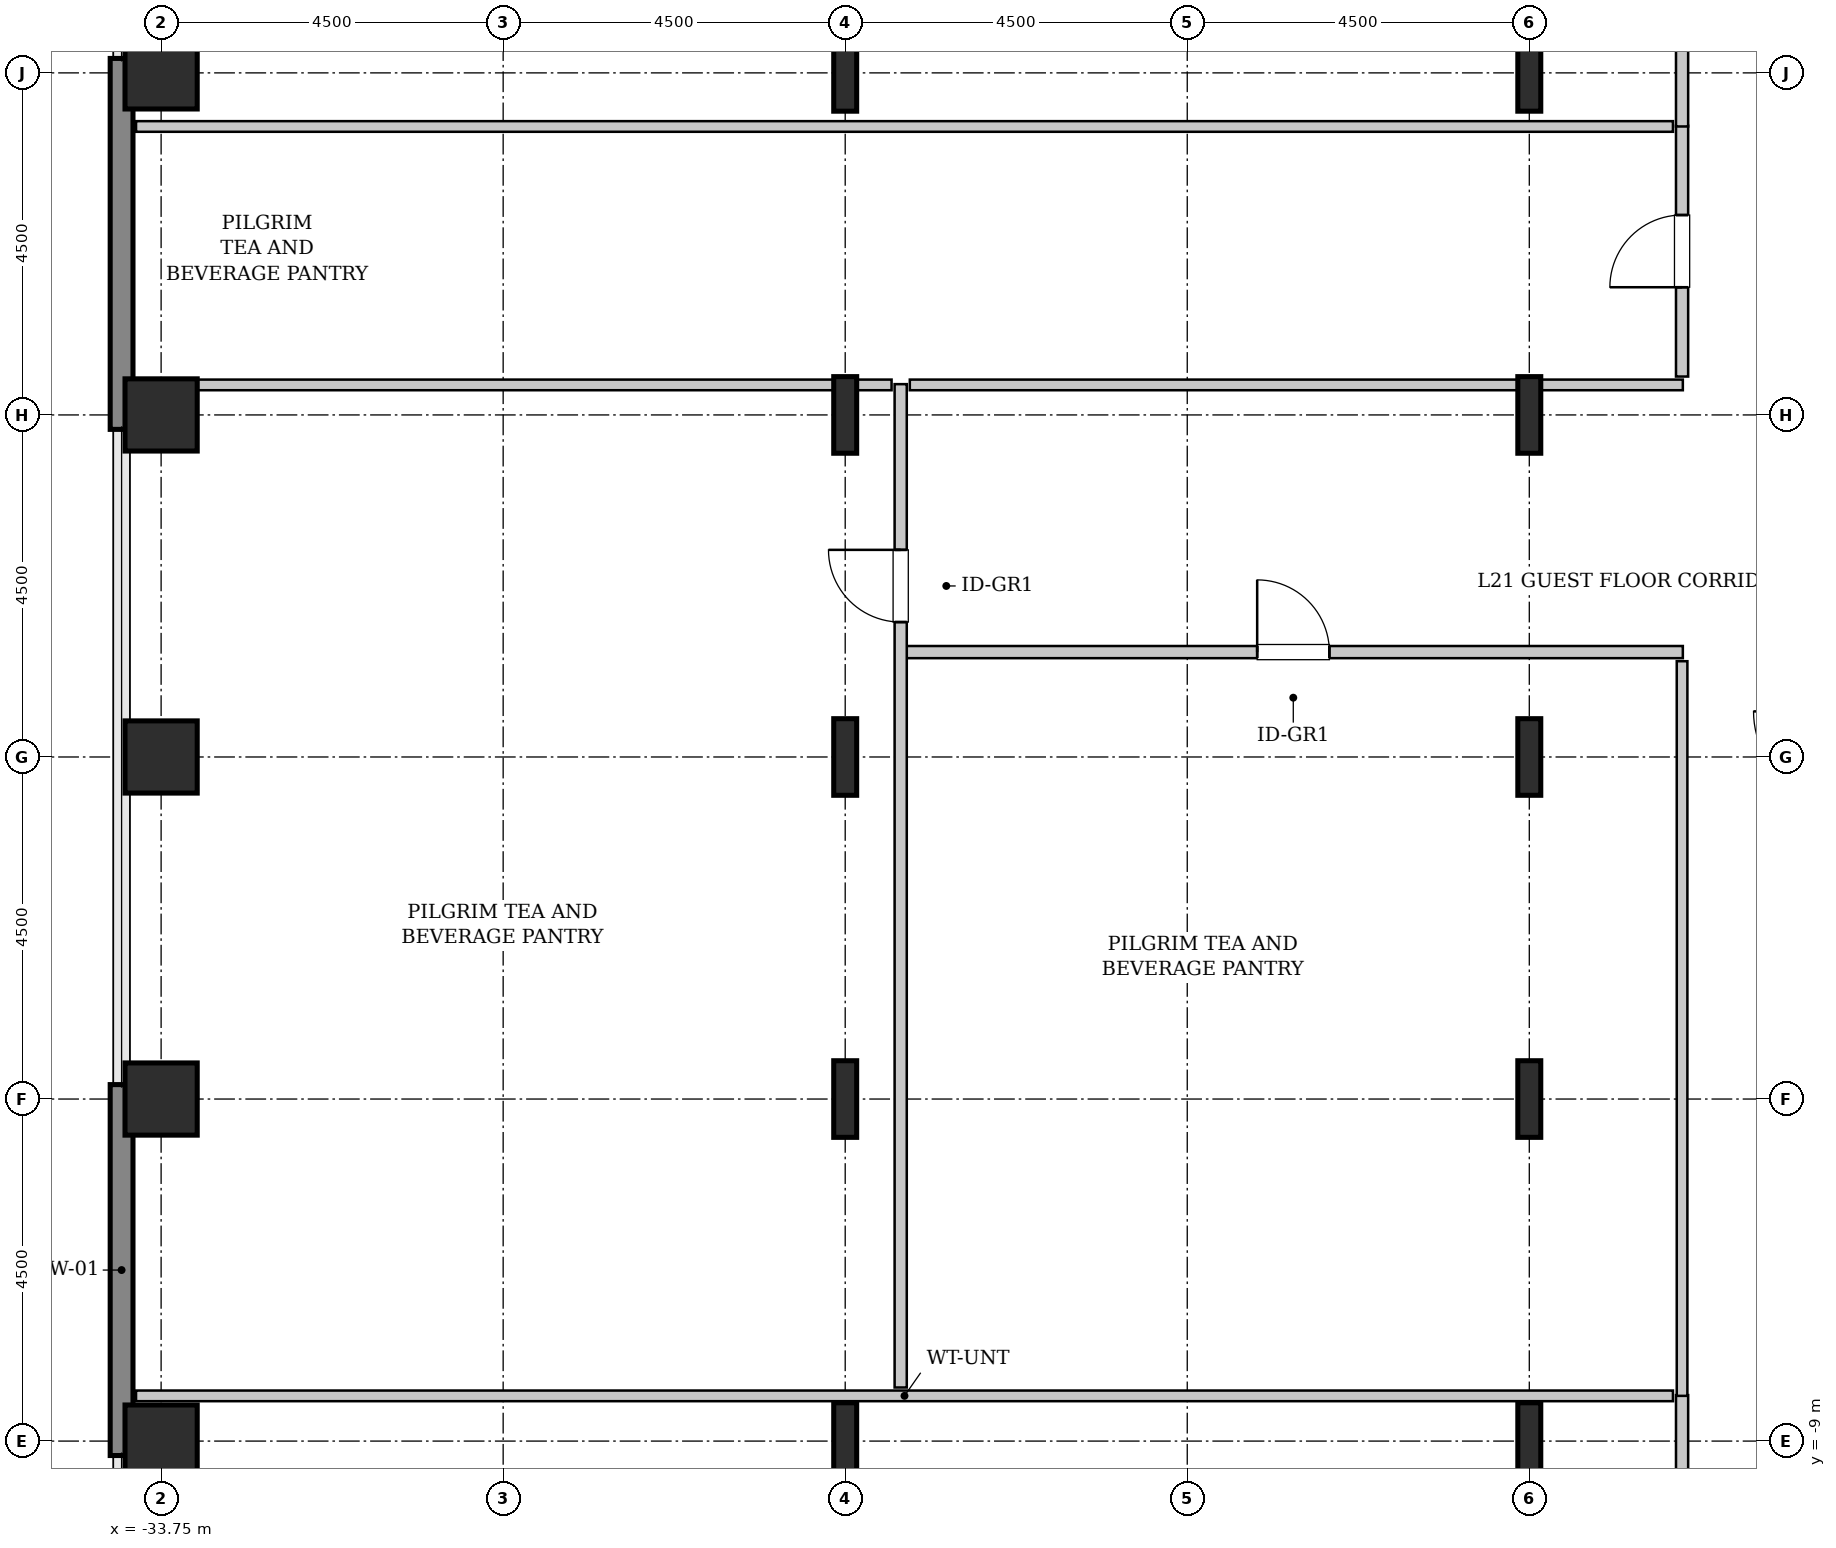
"""IFC4 building model, lengths in metres.
Left out: names, types, materials, properties, quantities, classifications, styles, units other than length and angle.
Written with IfcOpenShell. Run it as: python <this file> out.ifc"""

import sys

from ifc_helpers import new_model, si_unit, direction, frame, frame_2d, origin, origin_2d, place, context, subcontext, project, spatial, rectangle, hollow_rectangle, i_section, extrude, source, transform, mapped, element, fill, save


model = new_model("IFC4")
c1 = context("Model", 3, precision=1e-05, world=origin(), true_north=direction((0.0, 1.0)))
c2 = subcontext(c1, "Body", "Model", "MODEL_VIEW")
j1 = project(units=[si_unit("LENGTHUNIT", "METRE"), si_unit("PLANEANGLEUNIT", "RADIAN")], contexts=[c1])
p1 = place(None, origin())
s1 = spatial("IfcSite", under=j1, at=p1, CompositionType="ELEMENT")
p2 = place(p1, origin())
s2 = spatial("IfcBuilding", under=s1, at=p2, CompositionType="ELEMENT")
p3 = place(p2, frame((0.0, 0.0, 90.8)))
s3 = spatial("IfcBuildingStorey", under=s2, at=p3, CompositionType="ELEMENT", Elevation=90.8)
m1 = source(origin(), c2, "Body", "SweptSolid", [
    extrude(hollow_rectangle(XDim=0.95, YDim=0.95, WallThickness=0.045, InnerFilletRadius=0.045, OuterFilletRadius=0.09, at=origin_2d()), origin(), (0.0, 0.0, 1.0), 3.8),
])
for number, where, z_axis, x_axis in (
    (1, (-33.75, -9.0, 0.0), (0.0, 0.0, 1.0), (1.0, 0.0, 0.0)),
    (2, (-33.75, -4.5, 0.0), (0.0, 0.0, 1.0), (1.0, 0.0, 0.0)),
    (3, (-33.75, 0.0, 0.0), (0.0, 0.0, 1.0), (1.0, 0.0, 0.0)),
    (4, (-33.75, 4.5, 0.0), (0.0, 0.0, 1.0), (1.0, 0.0, 0.0)),
    (5, (-33.75, 9.0, 0.0), (0.0, 0.0, 1.0), (1.0, 0.0, 0.0)),
):
    element("IfcColumn", number, at=place(p3, frame(where, z_axis=z_axis, x_axis=x_axis)), inside=s3, PredefinedType="COLUMN", context=c2, shape_type="MappedRepresentation", body=[
        mapped(m1, transform((0.0, 0.0, 0.0), x_axis=(1.0, 0.0, 0.0), y_axis=(0.0, 1.0, 0.0), z_axis=(0.0, 0.0, 1.0), scale=1.0)),
    ])
m2 = source(origin(), c2, "Body", "SweptSolid", [
    extrude(i_section(OverallWidth=0.302, OverallDepth=1.008, WebThickness=0.021, FlangeThickness=0.04, FilletRadius=0.03, at=origin_2d()), origin(), (0.0, 0.0, 1.0), 3.8),
])
for number, where, z_axis, x_axis in (
    (6, (-24.75, -9.0, 0.0), (0.0, 0.0, 1.0), (1.0, 0.0, 0.0)),
    (7, (-24.75, -4.5, 0.0), (0.0, 0.0, 1.0), (1.0, 0.0, 0.0)),
    (8, (-24.75, 0.0, 0.0), (0.0, 0.0, 1.0), (1.0, 0.0, 0.0)),
    (9, (-24.75, 4.5, 0.0), (0.0, 0.0, 1.0), (1.0, 0.0, 0.0)),
    (10, (-24.75, 9.0, 0.0), (0.0, 0.0, 1.0), (1.0, 0.0, 0.0)),
    (11, (-15.75, -9.0, 0.0), (0.0, 0.0, 1.0), (1.0, 0.0, 0.0)),
    (12, (-15.75, -4.5, 0.0), (0.0, 0.0, 1.0), (1.0, 0.0, 0.0)),
    (13, (-15.75, 0.0, 0.0), (0.0, 0.0, 1.0), (1.0, 0.0, 0.0)),
    (14, (-15.75, 4.5, 0.0), (0.0, 0.0, 1.0), (1.0, 0.0, 0.0)),
    (15, (-15.75, 9.0, 0.0), (0.0, 0.0, 1.0), (1.0, 0.0, 0.0)),
):
    element("IfcColumn", number, at=place(p3, frame(where, z_axis=z_axis, x_axis=x_axis)), inside=s3, PredefinedType="COLUMN", context=c2, shape_type="MappedRepresentation", body=[
        mapped(m2, transform((0.0, 0.0, 0.0), x_axis=(1.0, 0.0, 0.0), y_axis=(0.0, 1.0, 0.0), z_axis=(0.0, 0.0, 1.0), scale=1.0)),
    ])
m3 = source(origin(), c2, "Body", "SweptSolid", [
    extrude(rectangle(XDim=4.88, YDim=0.3, at=frame_2d((2.44, 0.0))), origin(), (0.0, 0.0, 1.0), 3.55),
])
for number, where, z_axis, x_axis in (
    (16, (-34.27, -9.19, 0.0), (0.0, 0.0, 1.0), (0.0, 1.0, 0.0)),
    (17, (-34.27, 4.31, 0.0), (0.0, 0.0, 1.0), (0.0, 1.0, 0.0)),
):
    element("IfcWall", number, at=place(p3, frame(where, z_axis=z_axis, x_axis=x_axis)), inside=s3, PredefinedType="SHEAR", context=c2, shape_type="MappedRepresentation", body=[
        mapped(m3, transform((0.0, 0.0, 0.0), x_axis=(1.0, 0.0, 0.0), y_axis=(0.0, 1.0, 0.0), z_axis=(0.0, 0.0, 1.0), scale=1.0)),
    ])
m4 = source(origin(), c2, "Body", "SweptSolid", [
    extrude(rectangle(XDim=12.845, YDim=0.16, at=frame_2d((6.422, 0.0))), origin(), (0.0, 0.0, 1.0), 3.535),
])
p4 = place(p3, frame((-13.74, -21.24, 0.0), z_axis=(0.0, 0.0, 1.0), x_axis=(0.0, 1.0, 0.0)))
e18 = element("IfcWall", 18, at=p4, inside=s3, PredefinedType="PARTITIONING", context=c2, shape_type="MappedRepresentation", body=[
    mapped(m4, transform((0.0, 0.0, 0.0), x_axis=(1.0, 0.0, 0.0), y_axis=(0.0, 1.0, 0.0), z_axis=(0.0, 0.0, 1.0), scale=1.0)),
])
p5 = place(p4, frame((10.812, 0.0, 0.0)))
e19 = element("IfcOpeningElement", 19, at=p5, cuts=e18, PredefinedType="OPENING", context=c2, shape_type="SweptSolid", body=[
    extrude(rectangle(XDim=0.95, YDim=2.1, at=frame_2d((0.475, 1.05))), frame((0.0, 0.09, 0.0), z_axis=(0.0, -1.0, 0.0), x_axis=(1.0, 0.0, 0.0)), (0.0, 0.0, 1.0), 0.18),
])
m5 = source(origin(), c2, "Body", "SweptSolid", [
    extrude(rectangle(XDim=20.22, YDim=0.14, at=frame_2d((10.11, 0.0))), origin(), (0.0, 0.0, 1.0), 3.535),
])
p6 = place(p3, frame((-34.08, -8.405, 0.0), z_axis=(0.0, 0.0, 1.0), x_axis=(1.0, 0.0, 0.0)))
e20 = element("IfcWall", 20, at=p6, inside=s3, PredefinedType="PARTITIONING", context=c2, shape_type="MappedRepresentation", body=[
    mapped(m5, transform((0.0, 0.0, 0.0), x_axis=(1.0, 0.0, 0.0), y_axis=(0.0, 1.0, 0.0), z_axis=(0.0, 0.0, 1.0), scale=1.0)),
])
m6 = source(origin(), c2, "Body", "SweptSolid", [
    extrude(rectangle(XDim=10.25, YDim=0.16, at=frame_2d((5.125, 0.0))), origin(), (0.0, 0.0, 1.0), 3.535),
])
p7 = place(p3, frame((-23.98, 1.38, 0.0), z_axis=(0.0, 0.0, 1.0), x_axis=(1.0, 0.0, 0.0)))
e21 = element("IfcWall", 21, at=p7, inside=s3, PredefinedType="PARTITIONING", context=c2, shape_type="MappedRepresentation", body=[
    mapped(m6, transform((0.0, 0.0, 0.0), x_axis=(1.0, 0.0, 0.0), y_axis=(0.0, 1.0, 0.0), z_axis=(0.0, 0.0, 1.0), scale=1.0)),
])
p8 = place(p7, frame((4.65, 0.0, 0.0)))
e22 = element("IfcOpeningElement", 22, at=p8, cuts=e21, PredefinedType="OPENING", context=c2, shape_type="SweptSolid", body=[
    extrude(rectangle(XDim=0.95, YDim=2.1, at=frame_2d((0.475, 1.05))), frame((0.0, 0.09, 0.0), z_axis=(0.0, -1.0, 0.0), x_axis=(1.0, 0.0, 0.0)), (0.0, 0.0, 1.0), 0.18),
])
m7 = source(origin(), c2, "Body", "SweptSolid", [
    extrude(rectangle(XDim=9.665, YDim=0.14, at=frame_2d((4.833, 0.0))), origin(), (0.0, 0.0, 1.0), 3.535),
])
p9 = place(p3, frame((-13.74, -8.405, 0.0), z_axis=(0.0, 0.0, 1.0), x_axis=(0.0, 1.0, 0.0)))
e23 = element("IfcWall", 23, at=p9, inside=s3, PredefinedType="PARTITIONING", context=c2, shape_type="MappedRepresentation", body=[
    mapped(m7, transform((0.0, 0.0, 0.0), x_axis=(1.0, 0.0, 0.0), y_axis=(0.0, 1.0, 0.0), z_axis=(0.0, 0.0, 1.0), scale=1.0)),
])
m8 = source(origin(), c2, "Body", "SweptSolid", [
    extrude(rectangle(XDim=13.2, YDim=0.16, at=frame_2d((6.6, 0.0))), origin(), (0.0, 0.0, 1.0), 3.535),
])
p10 = place(p3, frame((-24.02, -8.295, 0.0), z_axis=(0.0, 0.0, 1.0), x_axis=(0.0, 1.0, 0.0)))
e24 = element("IfcWall", 24, at=p10, inside=s3, PredefinedType="PARTITIONING", context=c2, shape_type="MappedRepresentation", body=[
    mapped(m8, transform((0.0, 0.0, 0.0), x_axis=(1.0, 0.0, 0.0), y_axis=(0.0, 1.0, 0.0), z_axis=(0.0, 0.0, 1.0), scale=1.0)),
])
p11 = place(p10, frame((10.07, 0.0, 0.0)))
e25 = element("IfcOpeningElement", 25, at=p11, cuts=e24, PredefinedType="OPENING", context=c2, shape_type="SweptSolid", body=[
    extrude(rectangle(XDim=0.95, YDim=2.1, at=frame_2d((0.475, 1.05))), frame((0.0, 0.09, 0.0), z_axis=(0.0, -1.0, 0.0), x_axis=(1.0, 0.0, 0.0)), (0.0, 0.0, 1.0), 0.18),
])
m9 = source(origin(), c2, "Body", "SweptSolid", [
    extrude(rectangle(XDim=9.94, YDim=0.14, at=frame_2d((4.97, 0.0))), origin(), (0.0, 0.0, 1.0), 2.825),
])
p12 = place(p3, frame((-34.08, 4.895, 0.0), z_axis=(0.0, 0.0, 1.0), x_axis=(1.0, 0.0, 0.0)))
e26 = element("IfcWall", 26, at=p12, inside=s3, PredefinedType="PARTITIONING", context=c2, shape_type="MappedRepresentation", body=[
    mapped(m9, transform((0.0, 0.0, 0.0), x_axis=(1.0, 0.0, 0.0), y_axis=(0.0, 1.0, 0.0), z_axis=(0.0, 0.0, 1.0), scale=1.0)),
])
m10 = source(origin(), c2, "Body", "SweptSolid", [
    extrude(rectangle(XDim=10.17, YDim=0.14, at=frame_2d((5.085, 0.0))), origin(), (0.0, 0.0, 1.0), 2.825),
])
p13 = place(p3, frame((-23.9, 4.895, 0.0), z_axis=(0.0, 0.0, 1.0), x_axis=(1.0, 0.0, 0.0)))
e27 = element("IfcWall", 27, at=p13, inside=s3, PredefinedType="PARTITIONING", context=c2, shape_type="MappedRepresentation", body=[
    mapped(m10, transform((0.0, 0.0, 0.0), x_axis=(1.0, 0.0, 0.0), y_axis=(0.0, 1.0, 0.0), z_axis=(0.0, 0.0, 1.0), scale=1.0)),
])
m11 = source(origin(), c2, "Body", "SweptSolid", [
    extrude(rectangle(XDim=3.3, YDim=0.16, at=frame_2d((1.65, 0.0))), origin(), (0.0, 0.0, 1.0), 3.535),
])
p14 = place(p3, frame((-13.74, 5.005, 0.0), z_axis=(0.0, 0.0, 1.0), x_axis=(0.0, 1.0, 0.0)))
e28 = element("IfcWall", 28, at=p14, inside=s3, PredefinedType="PARTITIONING", context=c2, shape_type="MappedRepresentation", body=[
    mapped(m11, transform((0.0, 0.0, 0.0), x_axis=(1.0, 0.0, 0.0), y_axis=(0.0, 1.0, 0.0), z_axis=(0.0, 0.0, 1.0), scale=1.0)),
])
p15 = place(p14, frame((1.175, 0.0, 0.0)))
e29 = element("IfcOpeningElement", 29, at=p15, cuts=e28, PredefinedType="OPENING", context=c2, shape_type="SweptSolid", body=[
    extrude(rectangle(XDim=0.95, YDim=2.1, at=frame_2d((0.475, 1.05))), frame((0.0, 0.09, 0.0), z_axis=(0.0, -1.0, 0.0), x_axis=(1.0, 0.0, 0.0)), (0.0, 0.0, 1.0), 0.18),
])
p16 = place(p3, frame((-34.08, 8.295, 0.0), z_axis=(0.0, 0.0, 1.0), x_axis=(1.0, 0.0, 0.0)))
e30 = element("IfcWall", 30, at=p16, inside=s3, PredefinedType="PARTITIONING", context=c2, shape_type="MappedRepresentation", body=[
    mapped(m5, transform((0.0, 0.0, 0.0), x_axis=(1.0, 0.0, 0.0), y_axis=(0.0, 1.0, 0.0), z_axis=(0.0, 0.0, 1.0), scale=1.0)),
])
m12 = source(origin(), c2, "Body", "SweptSolid", [
    extrude(rectangle(XDim=12.945, YDim=0.16, at=frame_2d((6.473, 0.0))), origin(), (0.0, 0.0, 1.0), 3.535),
])
p17 = place(p3, frame((-13.74, 8.295, 0.0), z_axis=(0.0, 0.0, 1.0), x_axis=(0.0, 1.0, 0.0)))
e31 = element("IfcWall", 31, at=p17, inside=s3, PredefinedType="PARTITIONING", context=c2, shape_type="MappedRepresentation", body=[
    mapped(m12, transform((0.0, 0.0, 0.0), x_axis=(1.0, 0.0, 0.0), y_axis=(0.0, 1.0, 0.0), z_axis=(0.0, 0.0, 1.0), scale=1.0)),
])
p18 = place(p17, frame((1.133, 0.0, 0.0)))
e32 = element("IfcOpeningElement", 32, at=p18, cuts=e31, PredefinedType="OPENING", context=c2, shape_type="SweptSolid", body=[
    extrude(rectangle(XDim=0.95, YDim=2.1, at=frame_2d((0.475, 1.05))), frame((0.0, 0.09, 0.0), z_axis=(0.0, -1.0, 0.0), x_axis=(1.0, 0.0, 0.0)), (0.0, 0.0, 1.0), 0.18),
])
m13 = source(origin(), c2, "Body", "SweptSolid", [
    extrude(rectangle(XDim=0.95, YDim=2.1, at=frame_2d((0.475, 1.05))), frame((0.0, 0.025, 0.0), z_axis=(0.0, -1.0, 0.0), x_axis=(1.0, 0.0, 0.0)), (0.0, 0.0, 1.0), 0.05),
])
p19 = place(p8, origin())
e33 = element("IfcDoor", 33, at=p19, inside=s3, OperationType="SINGLE_SWING_LEFT", PredefinedType="DOOR", context=c2, shape_type="MappedRepresentation", body=[
    mapped(m13, transform((0.0, 0.0, 0.0), x_axis=(1.0, 0.0, 0.0), y_axis=(0.0, 1.0, 0.0), z_axis=(0.0, 0.0, 1.0), scale=1.0)),
])
fill(e22, e33)
p20 = place(p11, origin())
e34 = element("IfcDoor", 34, at=p20, inside=s3, OperationType="SINGLE_SWING_RIGHT", PredefinedType="DOOR", context=c2, shape_type="MappedRepresentation", body=[
    mapped(m13, transform((0.0, 0.0, 0.0), x_axis=(1.0, 0.0, 0.0), y_axis=(0.0, 1.0, 0.0), z_axis=(0.0, 0.0, 1.0), scale=1.0)),
])
fill(e25, e34)
p21 = place(p15, origin())
e35 = element("IfcDoor", 35, at=p21, inside=s3, OperationType="SINGLE_SWING_LEFT", PredefinedType="DOOR", context=c2, shape_type="MappedRepresentation", body=[
    mapped(m13, transform((0.0, 0.0, 0.0), x_axis=(1.0, 0.0, 0.0), y_axis=(0.0, 1.0, 0.0), z_axis=(0.0, 0.0, 1.0), scale=1.0)),
])
fill(e29, e35)
save(model, sys.argv[1])
